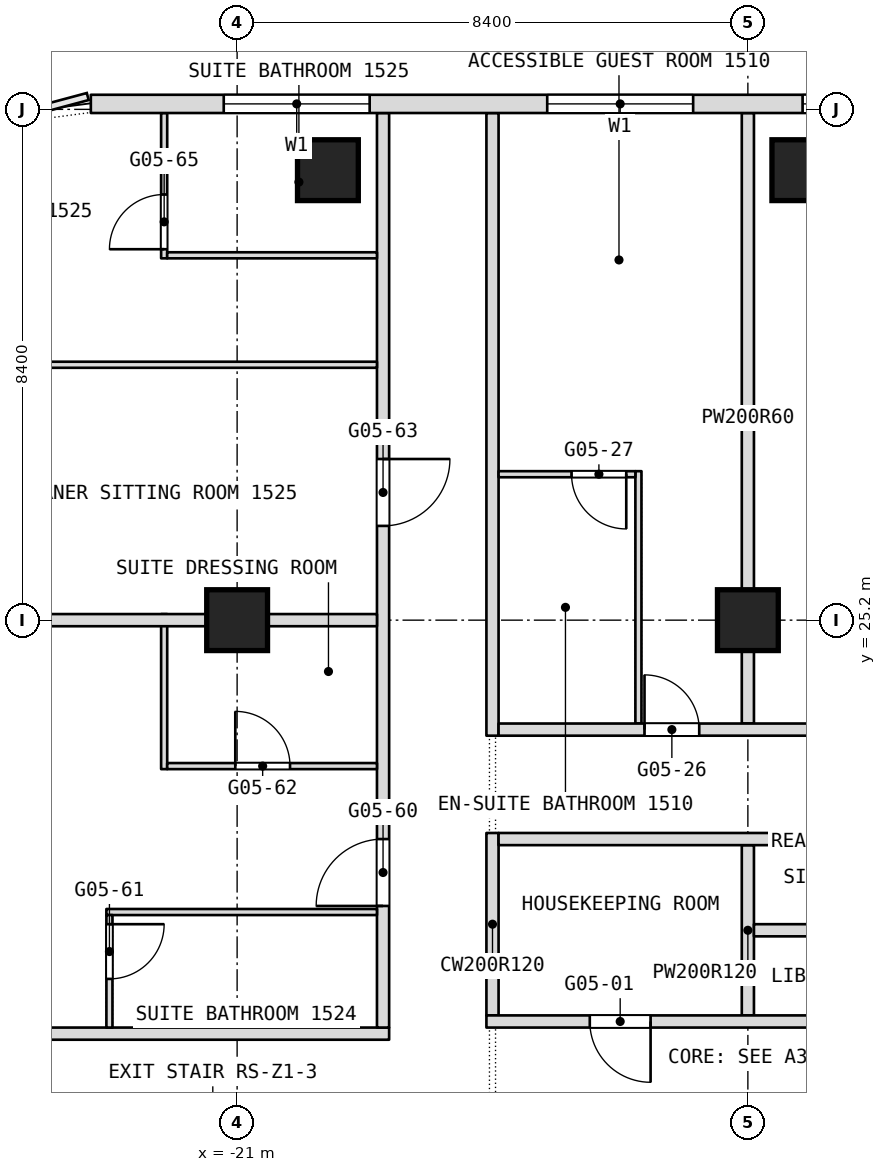
"""IFC4 building model, lengths in metres.
Left out: names, types, materials, properties, quantities, classifications, styles, units other than length and angle.
Written with IfcOpenShell. Run it as: python <this file> out.ifc"""

import sys

from ifc_helpers import new_model, si_unit, direction, frame, frame_2d, origin, origin_2d, place, context, subcontext, project, spatial, rectangle, extrude, element, fill, save


model = new_model("IFC4")
c1 = context("Model", 3, precision=1e-05, world=origin(), true_north=direction((0.0, 1.0)))
c2 = subcontext(c1, "Body", "Model", "MODEL_VIEW")
j1 = project(units=[si_unit("LENGTHUNIT", "METRE"), si_unit("PLANEANGLEUNIT", "RADIAN")], contexts=[c1])
p1 = place(None, origin())
s1 = spatial("IfcSite", under=j1, at=p1, CompositionType="ELEMENT")
p2 = place(p1, origin())
s2 = spatial("IfcBuilding", under=s1, at=p2, CompositionType="ELEMENT")
p3 = place(p2, frame((0.0, 0.0, 68.9)))
s3 = spatial("IfcBuildingStorey", under=s2, at=p3, CompositionType="ELEMENT", Elevation=68.9)
for number, where, z_axis, x_axis in (
    (1, (-21.0, 25.2, 0.0), (0.0, 0.0, 1.0), (1.0, 0.0, 0.0)),
    (2, (-12.6, 25.2, 0.0), (0.0, 0.0, 1.0), (1.0, 0.0, 0.0)),
    (3, (-19.507, 32.6, 0.0), (0.0, 0.0, 1.0), (1.0, 0.0, 0.0)),
    (4, (-11.704, 32.6, 0.0), (0.0, 0.0, 1.0), (1.0, 0.0, 0.0)),
):
    element("IfcColumn", number, at=place(p3, frame(where, z_axis=z_axis, x_axis=x_axis)), inside=s3, PredefinedType="COLUMN", context=c2, shape_type="SweptSolid", body=[
        extrude(rectangle(XDim=1.0, YDim=1.0, at=origin_2d()), origin(), (0.0, 0.0, 1.0), 3.6),
    ])
p4 = place(p3, frame((-12.6, 18.7, 0.0), z_axis=(0.0, 0.0, 1.0), x_axis=(0.0, 1.0, 0.0)))
e5 = element("IfcWall", 5, at=p4, inside=s3, PredefinedType="PARTITIONING", context=c2, shape_type="SweptSolid", body=[
    extrude(rectangle(XDim=2.8, YDim=0.2, at=frame_2d((1.4, 0.0))), origin(), (0.0, 0.0, 1.0), 3.34),
])
p5 = place(p3, frame((-12.6, 23.5, 0.0), z_axis=(0.0, 0.0, 1.0), x_axis=(0.0, 1.0, 0.0)))
e6 = element("IfcWall", 6, at=p5, inside=s3, PredefinedType="PARTITIONING", context=c2, shape_type="SweptSolid", body=[
    extrude(rectangle(XDim=10.04, YDim=0.2, at=frame_2d((5.02, 0.0))), origin(), (0.0, 0.0, 1.0), 3.34),
])
p6 = place(p3, frame((-14.4, 23.5, 0.0), z_axis=(0.0, 0.0, 1.0), x_axis=(0.0, 1.0, 0.0)))
e7 = element("IfcWall", 7, at=p6, inside=s3, PredefinedType="PARTITIONING", context=c2, shape_type="SweptSolid", body=[
    extrude(rectangle(XDim=4.15, YDim=0.1, at=frame_2d((2.075, 0.0))), origin(), (0.0, 0.0, 1.0), 3.34),
])
p7 = place(p3, frame((-16.8, 18.7, 0.0), z_axis=(0.0, 0.0, 1.0), x_axis=(0.0, 1.0, 0.0)))
e8 = element("IfcWall", 8, at=p7, inside=s3, PredefinedType="PARTITIONING", context=c2, shape_type="SweptSolid", body=[
    extrude(rectangle(XDim=3.0, YDim=0.2, at=frame_2d((1.5, 0.0))), origin(), (0.0, 0.0, 1.0), 3.34),
])
p8 = place(p3, frame((-16.8, 23.3, 0.0), z_axis=(0.0, 0.0, 1.0), x_axis=(0.0, 1.0, 0.0)))
e9 = element("IfcWall", 9, at=p8, inside=s3, PredefinedType="PARTITIONING", context=c2, shape_type="SweptSolid", body=[
    extrude(rectangle(XDim=10.24, YDim=0.2, at=frame_2d((5.12, 0.0))), origin(), (0.0, 0.0, 1.0), 3.34),
])
p9 = place(p3, frame((-24.5, 18.4, 0.0), z_axis=(0.0, 0.0, 1.0), x_axis=(1.0, 0.0, 0.0)))
e10 = element("IfcWall", 10, at=p9, inside=s3, PredefinedType="PARTITIONING", context=c2, shape_type="SweptSolid", body=[
    extrude(rectangle(XDim=6.0, YDim=0.2, at=frame_2d((3.0, 0.0))), origin(), (0.0, 0.0, 1.0), 3.34),
])
p10 = place(p3, frame((-18.6, 18.5, 0.0), z_axis=(0.0, 0.0, 1.0), x_axis=(0.0, 1.0, 0.0)))
e11 = element("IfcWall", 11, at=p10, inside=s3, PredefinedType="PARTITIONING", context=c2, shape_type="SweptSolid", body=[
    extrude(rectangle(XDim=15.04, YDim=0.2, at=frame_2d((7.52, 0.0))), origin(), (0.0, 0.0, 1.0), 3.34),
])
p11 = place(p10, frame((2.0, 0.0, 0.0)))
e12 = element("IfcOpeningElement", 12, at=p11, cuts=e11, PredefinedType="OPENING", context=c2, shape_type="SweptSolid", body=[
    extrude(rectangle(XDim=1.1, YDim=2.1, at=frame_2d((0.55, 1.05))), frame((0.0, 0.1, 0.0), z_axis=(0.0, -1.0, 0.0), x_axis=(1.0, 0.0, 0.0)), (0.0, 0.0, 1.0), 0.2),
])
p12 = place(p10, frame((8.25, 0.0, 0.0)))
e13 = element("IfcOpeningElement", 13, at=p12, cuts=e11, PredefinedType="OPENING", context=c2, shape_type="SweptSolid", body=[
    extrude(rectangle(XDim=1.1, YDim=2.1, at=frame_2d((0.55, 1.05))), frame((0.0, 0.1, 0.0), z_axis=(0.0, -1.0, 0.0), x_axis=(1.0, 0.0, 0.0)), (0.0, 0.0, 1.0), 0.2),
])
p13 = place(p3, frame((-16.9, 18.6, 0.0), z_axis=(0.0, 0.0, 1.0), x_axis=(1.0, 0.0, 0.0)))
e14 = element("IfcWall", 14, at=p13, inside=s3, PredefinedType="PARTITIONING", context=c2, shape_type="SweptSolid", body=[
    extrude(rectangle(XDim=25.1, YDim=0.2, at=frame_2d((12.55, 0.0))), origin(), (0.0, 0.0, 1.0), 3.34),
])
p14 = place(p13, frame((1.7, 0.0, 0.0)))
e15 = element("IfcOpeningElement", 15, at=p14, cuts=e14, PredefinedType="OPENING", context=c2, shape_type="SweptSolid", body=[
    extrude(rectangle(XDim=1.0, YDim=2.1, at=frame_2d((0.5, 1.05))), frame((0.0, 0.1, 0.0), z_axis=(0.0, -1.0, 0.0), x_axis=(1.0, 0.0, 0.0)), (0.0, 0.0, 1.0), 0.2),
])
p15 = place(p13, frame((8.0, 0.0, 0.0)))
e16 = element("IfcOpeningElement", 16, at=p15, cuts=e14, PredefinedType="OPENING", context=c2, shape_type="SweptSolid", body=[
    extrude(rectangle(XDim=1.0, YDim=2.1, at=frame_2d((0.5, 1.05))), frame((0.0, 0.1, 0.0), z_axis=(0.0, -1.0, 0.0), x_axis=(1.0, 0.0, 0.0)), (0.0, 0.0, 1.0), 0.2),
])
p16 = place(p13, frame((22.55, 0.0, 0.0)))
e17 = element("IfcOpeningElement", 17, at=p16, cuts=e14, PredefinedType="OPENING", context=c2, shape_type="SweptSolid", body=[
    extrude(rectangle(XDim=1.0, YDim=2.1, at=frame_2d((0.5, 1.05))), frame((0.0, 0.1, 0.0), z_axis=(0.0, -1.0, 0.0), x_axis=(1.0, 0.0, 0.0)), (0.0, 0.0, 1.0), 0.2),
])
p17 = place(p13, frame((14.3, 0.0, 0.0)))
e18 = element("IfcOpeningElement", 18, at=p17, cuts=e14, PredefinedType="OPENING", context=c2, shape_type="SweptSolid", body=[
    extrude(rectangle(XDim=1.0, YDim=2.1, at=frame_2d((0.5, 1.05))), frame((0.0, 0.1, 0.0), z_axis=(0.0, -1.0, 0.0), x_axis=(1.0, 0.0, 0.0)), (0.0, 0.0, 1.0), 0.2),
])
p18 = place(p13, frame((18.5, 0.0, 0.0)))
e19 = element("IfcOpeningElement", 19, at=p18, cuts=e14, PredefinedType="OPENING", context=c2, shape_type="SweptSolid", body=[
    extrude(rectangle(XDim=1.0, YDim=2.1, at=frame_2d((0.5, 1.05))), frame((0.0, 0.1, 0.0), z_axis=(0.0, -1.0, 0.0), x_axis=(1.0, 0.0, 0.0)), (0.0, 0.0, 1.0), 0.2),
])
p19 = place(p3, frame((-12.5, 20.1, 0.0), z_axis=(0.0, 0.0, 1.0), x_axis=(1.0, 0.0, 0.0)))
e20 = element("IfcWall", 20, at=p19, inside=s3, PredefinedType="PARTITIONING", context=c2, shape_type="SweptSolid", body=[
    extrude(rectangle(XDim=8.4, YDim=0.2, at=frame_2d((4.2, 0.0))), origin(), (0.0, 0.0, 1.0), 3.34),
])
p20 = place(p3, frame((-23.15, 20.4, 0.0), z_axis=(0.0, 0.0, 1.0), x_axis=(1.0, 0.0, 0.0)))
e21 = element("IfcWall", 21, at=p20, inside=s3, PredefinedType="PARTITIONING", context=c2, shape_type="SweptSolid", body=[
    extrude(rectangle(XDim=4.45, YDim=0.1, at=frame_2d((2.225, 0.0))), origin(), (0.0, 0.0, 1.0), 3.34),
])
p21 = place(p3, frame((-16.7, 21.6, 0.0), z_axis=(0.0, 0.0, 1.0), x_axis=(1.0, 0.0, 0.0)))
e22 = element("IfcWall", 22, at=p21, inside=s3, PredefinedType="PARTITIONING", context=c2, shape_type="SweptSolid", body=[
    extrude(rectangle(XDim=24.7, YDim=0.2, at=frame_2d((12.35, 0.0))), origin(), (0.0, 0.0, 1.0), 3.34),
])
p22 = place(p21, frame((7.8, 0.0, 0.0)))
e23 = element("IfcOpeningElement", 23, at=p22, cuts=e22, PredefinedType="OPENING", context=c2, shape_type="SweptSolid", body=[
    extrude(rectangle(XDim=1.0, YDim=2.1, at=frame_2d((0.5, 1.05))), frame((0.0, 0.1, 0.0), z_axis=(0.0, -1.0, 0.0), x_axis=(1.0, 0.0, 0.0)), (0.0, 0.0, 1.0), 0.2),
])
p23 = place(p21, frame((22.25, 0.0, 0.0)))
e24 = element("IfcOpeningElement", 24, at=p23, cuts=e22, PredefinedType="OPENING", context=c2, shape_type="SweptSolid", body=[
    extrude(rectangle(XDim=1.0, YDim=2.1, at=frame_2d((0.5, 1.05))), frame((0.0, 0.1, 0.0), z_axis=(0.0, -1.0, 0.0), x_axis=(1.0, 0.0, 0.0)), (0.0, 0.0, 1.0), 0.2),
])
p24 = place(p3, frame((-22.2, 22.75, 0.0), z_axis=(0.0, 0.0, 1.0), x_axis=(0.0, 1.0, 0.0)))
e25 = element("IfcWall", 25, at=p24, inside=s3, PredefinedType="PARTITIONING", context=c2, shape_type="SweptSolid", body=[
    extrude(rectangle(XDim=2.55, YDim=0.1, at=frame_2d((1.275, 0.0))), origin(), (0.0, 0.0, 1.0), 3.34),
])
p25 = place(p3, frame((-22.2, 31.15, 0.0), z_axis=(0.0, 0.0, 1.0), x_axis=(0.0, 1.0, 0.0)))
e26 = element("IfcWall", 26, at=p25, inside=s3, PredefinedType="PARTITIONING", context=c2, shape_type="SweptSolid", body=[
    extrude(rectangle(XDim=2.39, YDim=0.1, at=frame_2d((1.195, 0.0))), origin(), (0.0, 0.0, 1.0), 3.34),
])
p26 = place(p25, frame((0.15, 0.0, 0.0)))
e27 = element("IfcOpeningElement", 27, at=p26, cuts=e26, PredefinedType="OPENING", context=c2, shape_type="SweptSolid", body=[
    extrude(rectangle(XDim=0.9, YDim=2.1, at=frame_2d((0.45, 1.05))), frame((0.0, 0.05, 0.0), z_axis=(0.0, -1.0, 0.0), x_axis=(1.0, 0.0, 0.0)), (0.0, 0.0, 1.0), 0.1),
])
p27 = place(p3, frame((-22.15, 22.8, 0.0), z_axis=(0.0, 0.0, 1.0), x_axis=(1.0, 0.0, 0.0)))
e28 = element("IfcWall", 28, at=p27, inside=s3, PredefinedType="PARTITIONING", context=c2, shape_type="SweptSolid", body=[
    extrude(rectangle(XDim=3.45, YDim=0.1, at=frame_2d((1.725, 0.0))), origin(), (0.0, 0.0, 1.0), 3.34),
])
p28 = place(p27, frame((1.12, 0.0, 0.0)))
e29 = element("IfcOpeningElement", 29, at=p28, cuts=e28, PredefinedType="OPENING", context=c2, shape_type="SweptSolid", body=[
    extrude(rectangle(XDim=0.9, YDim=2.1, at=frame_2d((0.45, 1.05))), frame((0.0, 0.05, 0.0), z_axis=(0.0, -1.0, 0.0), x_axis=(1.0, 0.0, 0.0)), (0.0, 0.0, 1.0), 0.1),
])
p29 = place(p3, frame((-23.1, 18.5, 0.0), z_axis=(0.0, 0.0, 1.0), x_axis=(0.0, 1.0, 0.0)))
e30 = element("IfcWall", 30, at=p29, inside=s3, PredefinedType="PARTITIONING", context=c2, shape_type="SweptSolid", body=[
    extrude(rectangle(XDim=1.85, YDim=0.1, at=frame_2d((0.925, 0.0))), origin(), (0.0, 0.0, 1.0), 3.34),
])
p30 = place(p29, frame((0.8, 0.0, 0.0)))
e31 = element("IfcOpeningElement", 31, at=p30, cuts=e30, PredefinedType="OPENING", context=c2, shape_type="SweptSolid", body=[
    extrude(rectangle(XDim=0.9, YDim=2.1, at=frame_2d((0.45, 1.05))), frame((0.0, 0.05, 0.0), z_axis=(0.0, -1.0, 0.0), x_axis=(1.0, 0.0, 0.0)), (0.0, 0.0, 1.0), 0.1),
])
p31 = place(p3, frame((-16.7, 23.4, 0.0), z_axis=(0.0, 0.0, 1.0), x_axis=(1.0, 0.0, 0.0)))
e32 = element("IfcWall", 32, at=p31, inside=s3, PredefinedType="PARTITIONING", context=c2, shape_type="SweptSolid", body=[
    extrude(rectangle(XDim=23.4, YDim=0.2, at=frame_2d((11.7, 0.0))), origin(), (0.0, 0.0, 1.0), 3.34),
])
p32 = place(p31, frame((2.4, 0.0, 0.0)))
e33 = element("IfcOpeningElement", 33, at=p32, cuts=e32, PredefinedType="OPENING", context=c2, shape_type="SweptSolid", body=[
    extrude(rectangle(XDim=0.9, YDim=2.1, at=frame_2d((0.45, 1.05))), frame((0.0, 0.1, 0.0), z_axis=(0.0, -1.0, 0.0), x_axis=(1.0, 0.0, 0.0)), (0.0, 0.0, 1.0), 0.2),
])
p33 = place(p31, frame((5.65, 0.0, 0.0)))
e34 = element("IfcOpeningElement", 34, at=p33, cuts=e32, PredefinedType="OPENING", context=c2, shape_type="SweptSolid", body=[
    extrude(rectangle(XDim=1.1, YDim=2.1, at=frame_2d((0.55, 1.05))), frame((0.0, 0.1, 0.0), z_axis=(0.0, -1.0, 0.0), x_axis=(1.0, 0.0, 0.0)), (0.0, 0.0, 1.0), 0.2),
])
p34 = place(p31, frame((16.2, 0.0, 0.0)))
e35 = element("IfcOpeningElement", 35, at=p34, cuts=e32, PredefinedType="OPENING", context=c2, shape_type="SweptSolid", body=[
    extrude(rectangle(XDim=1.1, YDim=2.1, at=frame_2d((0.55, 1.05))), frame((0.0, 0.1, 0.0), z_axis=(0.0, -1.0, 0.0), x_axis=(1.0, 0.0, 0.0)), (0.0, 0.0, 1.0), 0.2),
])
p35 = place(p3, frame((-29.7, 25.2, 0.0), z_axis=(0.0, 0.0, 1.0), x_axis=(1.0, 0.0, 0.0)))
e36 = element("IfcWall", 36, at=p35, inside=s3, PredefinedType="PARTITIONING", context=c2, shape_type="SweptSolid", body=[
    extrude(rectangle(XDim=11.0, YDim=0.2, at=frame_2d((5.5, 0.0))), origin(), (0.0, 0.0, 1.0), 2.84),
])
p36 = place(p3, frame((-16.7, 27.6, 0.0), z_axis=(0.0, 0.0, 1.0), x_axis=(1.0, 0.0, 0.0)))
e37 = element("IfcWall", 37, at=p36, inside=s3, PredefinedType="PARTITIONING", context=c2, shape_type="SweptSolid", body=[
    extrude(rectangle(XDim=2.25, YDim=0.1, at=frame_2d((1.125, 0.0))), origin(), (0.0, 0.0, 1.0), 3.34),
])
p37 = place(p36, frame((1.2, 0.0, 0.0)))
e38 = element("IfcOpeningElement", 38, at=p37, cuts=e37, PredefinedType="OPENING", context=c2, shape_type="SweptSolid", body=[
    extrude(rectangle(XDim=0.9, YDim=2.1, at=frame_2d((0.45, 1.05))), frame((0.0, 0.05, 0.0), z_axis=(0.0, -1.0, 0.0), x_axis=(1.0, 0.0, 0.0)), (0.0, 0.0, 1.0), 0.1),
])
p38 = place(p3, frame((-29.393, 29.4, 0.0), z_axis=(0.0, 0.0, 1.0), x_axis=(1.0, 0.0, 0.0)))
e39 = element("IfcWall", 39, at=p38, inside=s3, PredefinedType="PARTITIONING", context=c2, shape_type="SweptSolid", body=[
    extrude(rectangle(XDim=10.693, YDim=0.1, at=frame_2d((5.347, 0.0))), origin(), (0.0, 0.0, 1.0), 3.34),
])
p39 = place(p38, frame((3.863, 0.0, 0.0)))
e40 = element("IfcOpeningElement", 40, at=p39, cuts=e39, PredefinedType="OPENING", context=c2, shape_type="SweptSolid", body=[
    extrude(rectangle(XDim=0.9, YDim=2.1, at=frame_2d((0.45, 1.05))), frame((0.0, 0.05, 0.0), z_axis=(0.0, -1.0, 0.0), x_axis=(1.0, 0.0, 0.0)), (0.0, 0.0, 1.0), 0.1),
])
p40 = place(p3, frame((-22.15, 31.2, 0.0), z_axis=(0.0, 0.0, 1.0), x_axis=(1.0, 0.0, 0.0)))
e41 = element("IfcWall", 41, at=p40, inside=s3, PredefinedType="PARTITIONING", context=c2, shape_type="SweptSolid", body=[
    extrude(rectangle(XDim=3.45, YDim=0.1, at=frame_2d((1.725, 0.0))), origin(), (0.0, 0.0, 1.0), 3.34),
])
p41 = place(p3, frame((23.406, 33.69, 0.0), z_axis=(0.0, 0.0, 1.0), x_axis=(-1.0, 0.0, 0.0)))
e42 = element("IfcWall", 42, at=p41, inside=s3, PredefinedType="NOTDEFINED", context=c2, shape_type="SweptSolid", body=[
    extrude(rectangle(XDim=46.812, YDim=0.3, at=frame_2d((23.406, 0.0))), origin(), (0.0, 0.0, 1.0), 3.6),
])
p42 = place(p41, frame((2.186, 0.0, 0.9)))
e43 = element("IfcOpeningElement", 43, at=p42, cuts=e42, PredefinedType="OPENING", context=c2, shape_type="SweptSolid", body=[
    extrude(rectangle(XDim=2.4, YDim=2.1, at=frame_2d((1.2, 1.05))), frame((0.0, 0.15, 0.0), z_axis=(0.0, -1.0, 0.0), x_axis=(1.0, 0.0, 0.0)), (0.0, 0.0, 1.0), 0.3),
])
p43 = place(p41, frame((7.506, 0.0, 0.9)))
e44 = element("IfcOpeningElement", 44, at=p43, cuts=e42, PredefinedType="OPENING", context=c2, shape_type="SweptSolid", body=[
    extrude(rectangle(XDim=2.4, YDim=2.1, at=frame_2d((1.2, 1.05))), frame((0.0, 0.15, 0.0), z_axis=(0.0, -1.0, 0.0), x_axis=(1.0, 0.0, 0.0)), (0.0, 0.0, 1.0), 0.3),
])
p44 = place(p41, frame((11.706, 0.0, 0.9)))
e45 = element("IfcOpeningElement", 45, at=p44, cuts=e42, PredefinedType="OPENING", context=c2, shape_type="SweptSolid", body=[
    extrude(rectangle(XDim=2.4, YDim=2.1, at=frame_2d((1.2, 1.05))), frame((0.0, 0.15, 0.0), z_axis=(0.0, -1.0, 0.0), x_axis=(1.0, 0.0, 0.0)), (0.0, 0.0, 1.0), 0.3),
])
p45 = place(p41, frame((15.906, 0.0, 0.9)))
e46 = element("IfcOpeningElement", 46, at=p45, cuts=e42, PredefinedType="OPENING", context=c2, shape_type="SweptSolid", body=[
    extrude(rectangle(XDim=2.4, YDim=2.1, at=frame_2d((1.2, 1.05))), frame((0.0, 0.15, 0.0), z_axis=(0.0, -1.0, 0.0), x_axis=(1.0, 0.0, 0.0)), (0.0, 0.0, 1.0), 0.3),
])
p46 = place(p41, frame((20.106, 0.0, 0.9)))
e47 = element("IfcOpeningElement", 47, at=p46, cuts=e42, PredefinedType="OPENING", context=c2, shape_type="SweptSolid", body=[
    extrude(rectangle(XDim=2.4, YDim=2.1, at=frame_2d((1.2, 1.05))), frame((0.0, 0.15, 0.0), z_axis=(0.0, -1.0, 0.0), x_axis=(1.0, 0.0, 0.0)), (0.0, 0.0, 1.0), 0.3),
])
p47 = place(p41, frame((24.306, 0.0, 0.9)))
e48 = element("IfcOpeningElement", 48, at=p47, cuts=e42, PredefinedType="OPENING", context=c2, shape_type="SweptSolid", body=[
    extrude(rectangle(XDim=2.4, YDim=2.1, at=frame_2d((1.2, 1.05))), frame((0.0, 0.15, 0.0), z_axis=(0.0, -1.0, 0.0), x_axis=(1.0, 0.0, 0.0)), (0.0, 0.0, 1.0), 0.3),
])
p48 = place(p41, frame((28.506, 0.0, 0.9)))
e49 = element("IfcOpeningElement", 49, at=p48, cuts=e42, PredefinedType="OPENING", context=c2, shape_type="SweptSolid", body=[
    extrude(rectangle(XDim=2.4, YDim=2.1, at=frame_2d((1.2, 1.05))), frame((0.0, 0.15, 0.0), z_axis=(0.0, -1.0, 0.0), x_axis=(1.0, 0.0, 0.0)), (0.0, 0.0, 1.0), 0.3),
])
p49 = place(p41, frame((32.706, 0.0, 0.9)))
e50 = element("IfcOpeningElement", 50, at=p49, cuts=e42, PredefinedType="OPENING", context=c2, shape_type="SweptSolid", body=[
    extrude(rectangle(XDim=2.4, YDim=2.1, at=frame_2d((1.2, 1.05))), frame((0.0, 0.15, 0.0), z_axis=(0.0, -1.0, 0.0), x_axis=(1.0, 0.0, 0.0)), (0.0, 0.0, 1.0), 0.3),
])
p50 = place(p41, frame((36.906, 0.0, 0.9)))
e51 = element("IfcOpeningElement", 51, at=p50, cuts=e42, PredefinedType="OPENING", context=c2, shape_type="SweptSolid", body=[
    extrude(rectangle(XDim=2.4, YDim=2.1, at=frame_2d((1.2, 1.05))), frame((0.0, 0.15, 0.0), z_axis=(0.0, -1.0, 0.0), x_axis=(1.0, 0.0, 0.0)), (0.0, 0.0, 1.0), 0.3),
])
p51 = place(p41, frame((42.226, 0.0, 0.9)))
e52 = element("IfcOpeningElement", 52, at=p51, cuts=e42, PredefinedType="OPENING", context=c2, shape_type="SweptSolid", body=[
    extrude(rectangle(XDim=2.4, YDim=2.1, at=frame_2d((1.2, 1.05))), frame((0.0, 0.15, 0.0), z_axis=(0.0, -1.0, 0.0), x_axis=(1.0, 0.0, 0.0)), (0.0, 0.0, 1.0), 0.3),
])
p52 = place(p11, origin())
e53 = element("IfcDoor", 53, at=p52, inside=s3, OperationType="SINGLE_SWING_LEFT", PredefinedType="DOOR", context=c2, shape_type="SweptSolid", body=[
    extrude(rectangle(XDim=1.1, YDim=2.1, at=frame_2d((0.55, 1.05))), frame((0.0, 0.025, 0.0), z_axis=(0.0, -1.0, 0.0), x_axis=(1.0, 0.0, 0.0)), (0.0, 0.0, 1.0), 0.05),
])
fill(e12, e53)
p53 = place(p12, origin())
e54 = element("IfcDoor", 54, at=p53, inside=s3, OperationType="SINGLE_SWING_RIGHT", PredefinedType="DOOR", context=c2, shape_type="SweptSolid", body=[
    extrude(rectangle(XDim=1.1, YDim=2.1, at=frame_2d((0.55, 1.05))), frame((0.0, 0.025, 0.0), z_axis=(0.0, -1.0, 0.0), x_axis=(1.0, 0.0, 0.0)), (0.0, 0.0, 1.0), 0.05),
])
fill(e13, e54)
p54 = place(p14, origin())
e55 = element("IfcDoor", 55, at=p54, inside=s3, OperationType="SINGLE_SWING_RIGHT", PredefinedType="DOOR", context=c2, shape_type="SweptSolid", body=[
    extrude(rectangle(XDim=1.0, YDim=2.1, at=frame_2d((0.5, 1.05))), frame((0.0, 0.025, 0.0), z_axis=(0.0, -1.0, 0.0), x_axis=(1.0, 0.0, 0.0)), (0.0, 0.0, 1.0), 0.05),
])
fill(e15, e55)
p55 = place(p26, origin())
e56 = element("IfcDoor", 56, at=p55, inside=s3, OperationType="SINGLE_SWING_RIGHT", PredefinedType="DOOR", context=c2, shape_type="SweptSolid", body=[
    extrude(rectangle(XDim=0.9, YDim=2.1, at=frame_2d((0.45, 1.05))), frame((0.0, 0.025, 0.0), z_axis=(0.0, -1.0, 0.0), x_axis=(1.0, 0.0, 0.0)), (0.0, 0.0, 1.0), 0.05),
])
fill(e27, e56)
p56 = place(p28, origin())
e57 = element("IfcDoor", 57, at=p56, inside=s3, OperationType="SINGLE_SWING_LEFT", PredefinedType="DOOR", context=c2, shape_type="SweptSolid", body=[
    extrude(rectangle(XDim=0.9, YDim=2.1, at=frame_2d((0.45, 1.05))), frame((0.0, 0.025, 0.0), z_axis=(0.0, -1.0, 0.0), x_axis=(1.0, 0.0, 0.0)), (0.0, 0.0, 1.0), 0.05),
])
fill(e29, e57)
p57 = place(p30, origin())
e58 = element("IfcDoor", 58, at=p57, inside=s3, OperationType="SINGLE_SWING_LEFT", PredefinedType="DOOR", context=c2, shape_type="SweptSolid", body=[
    extrude(rectangle(XDim=0.9, YDim=2.1, at=frame_2d((0.45, 1.05))), frame((0.0, 0.025, 0.0), z_axis=(0.0, -1.0, 0.0), x_axis=(1.0, 0.0, 0.0)), (0.0, 0.0, 1.0), 0.05),
])
fill(e31, e58)
p58 = place(p32, origin())
e59 = element("IfcDoor", 59, at=p58, inside=s3, OperationType="SINGLE_SWING_LEFT", PredefinedType="DOOR", context=c2, shape_type="SweptSolid", body=[
    extrude(rectangle(XDim=0.9, YDim=2.1, at=frame_2d((0.45, 1.05))), frame((0.0, 0.025, 0.0), z_axis=(0.0, -1.0, 0.0), x_axis=(1.0, 0.0, 0.0)), (0.0, 0.0, 1.0), 0.05),
])
fill(e33, e59)
p59 = place(p37, origin())
e60 = element("IfcDoor", 60, at=p59, inside=s3, OperationType="SINGLE_SWING_LEFT", PredefinedType="DOOR", context=c2, shape_type="SweptSolid", body=[
    extrude(rectangle(XDim=0.9, YDim=2.1, at=frame_2d((0.45, 1.05))), frame((0.0, 0.025, 0.0), z_axis=(0.0, -1.0, 0.0), x_axis=(1.0, 0.0, 0.0)), (0.0, 0.0, 1.0), 0.05),
])
fill(e38, e60)
p60 = place(p49, origin())
e61 = element("IfcWindow", 61, at=p60, inside=s3, PartitioningType="SINGLE_PANEL", PredefinedType="WINDOW", context=c2, shape_type="SweptSolid", body=[
    extrude(rectangle(XDim=2.4, YDim=2.1, at=frame_2d((1.2, 1.05))), frame((0.0, 0.03, 0.0), z_axis=(0.0, -1.0, 0.0), x_axis=(1.0, 0.0, 0.0)), (0.0, 0.0, 1.0), 0.06),
])
fill(e50, e61)
p61 = place(p50, origin())
e62 = element("IfcWindow", 62, at=p61, inside=s3, PartitioningType="SINGLE_PANEL", PredefinedType="WINDOW", context=c2, shape_type="SweptSolid", body=[
    extrude(rectangle(XDim=2.4, YDim=2.1, at=frame_2d((1.2, 1.05))), frame((0.0, 0.03, 0.0), z_axis=(0.0, -1.0, 0.0), x_axis=(1.0, 0.0, 0.0)), (0.0, 0.0, 1.0), 0.06),
])
fill(e51, e62)
p62 = place(p51, origin())
e63 = element("IfcWindow", 63, at=p62, inside=s3, PartitioningType="SINGLE_PANEL", PredefinedType="WINDOW", context=c2, shape_type="SweptSolid", body=[
    extrude(rectangle(XDim=2.4, YDim=2.1, at=frame_2d((1.2, 1.05))), frame((0.0, 0.03, 0.0), z_axis=(0.0, -1.0, 0.0), x_axis=(1.0, 0.0, 0.0)), (0.0, 0.0, 1.0), 0.06),
])
fill(e52, e63)
save(model, sys.argv[1])
